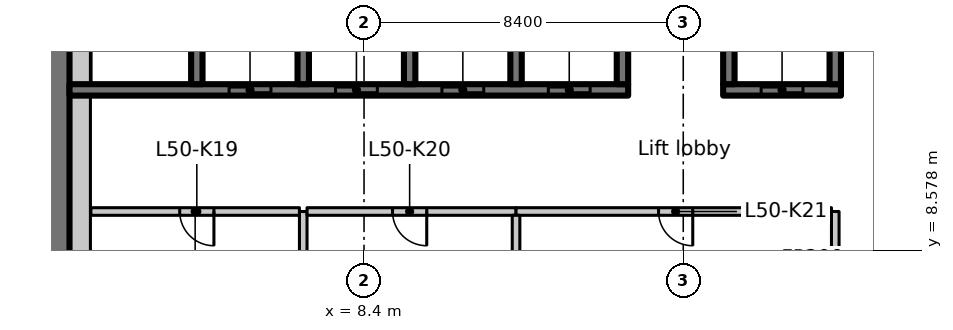
"""IFC4 building model, lengths in metres.
Left out: names, types, materials, properties, quantities, classifications, styles, units other than length and angle.
Written with IfcOpenShell. Run it as: python <this file> out.ifc"""

import sys

from ifc_helpers import new_model, si_unit, direction, frame, frame_2d, origin, place, context, subcontext, project, spatial, rectangle, extrude, element, fill, save


model = new_model("IFC4")
c1 = context("Model", 3, precision=1e-05, world=origin(), true_north=direction((0.0, 1.0)))
c2 = subcontext(c1, "Body", "Model", "MODEL_VIEW")
j1 = project(units=[si_unit("LENGTHUNIT", "METRE"), si_unit("PLANEANGLEUNIT", "RADIAN")], contexts=[c1])
p1 = place(None, origin())
s1 = spatial("IfcSite", under=j1, at=p1, CompositionType="ELEMENT")
p2 = place(p1, origin())
s2 = spatial("IfcBuilding", under=s1, at=p2, CompositionType="ELEMENT")
p3 = place(p2, frame((0.0, 0.0, 199.2)))
s3 = spatial("IfcBuildingStorey", under=s2, at=p3, CompositionType="ELEMENT", Elevation=199.2)
p4 = place(p3, frame((0.325, 7.286, 0.0), z_axis=(0.0, 0.0, 1.0), x_axis=(0.0, 1.0, 0.0)))
e1 = element("IfcWall", 1, at=p4, inside=s3, PredefinedType="SHEAR", context=c2, shape_type="SweptSolid", body=[
    extrude(rectangle(XDim=8.864, YDim=0.65, at=frame_2d((4.432, 0.0))), origin(), (0.0, 0.0, 1.0), 3.35),
])
p5 = place(p3, frame((0.65, 12.8, 0.0), z_axis=(0.0, 0.0, 1.0), x_axis=(1.0, 0.0, 0.0)))
e2 = element("IfcWall", 2, at=p5, inside=s3, PredefinedType="SHEAR", context=c2, shape_type="SweptSolid", body=[
    extrude(rectangle(XDim=14.7, YDim=0.3, at=frame_2d((7.35, 0.0))), origin(), (0.0, 0.0, 1.0), 3.35),
])
p6 = place(p5, frame((4.2, 0.0, 0.0)))
e3 = element("IfcOpeningElement", 3, at=p6, cuts=e2, PredefinedType="OPENING", context=c2, shape_type="SweptSolid", body=[
    extrude(rectangle(XDim=1.1, YDim=2.3, at=frame_2d((0.55, 1.15))), frame((0.0, 0.16, 0.0), z_axis=(0.0, -1.0, 0.0), x_axis=(1.0, 0.0, 0.0)), (0.0, 0.0, 1.0), 0.32),
])
p7 = place(p5, frame((7.0, 0.0, 0.0)))
e4 = element("IfcOpeningElement", 4, at=p7, cuts=e2, PredefinedType="OPENING", context=c2, shape_type="SweptSolid", body=[
    extrude(rectangle(XDim=1.1, YDim=2.3, at=frame_2d((0.55, 1.15))), frame((0.0, 0.16, 0.0), z_axis=(0.0, -1.0, 0.0), x_axis=(1.0, 0.0, 0.0)), (0.0, 0.0, 1.0), 0.32),
])
p8 = place(p5, frame((9.8, 0.0, 0.0)))
e5 = element("IfcOpeningElement", 5, at=p8, cuts=e2, PredefinedType="OPENING", context=c2, shape_type="SweptSolid", body=[
    extrude(rectangle(XDim=1.1, YDim=2.3, at=frame_2d((0.55, 1.15))), frame((0.0, 0.16, 0.0), z_axis=(0.0, -1.0, 0.0), x_axis=(1.0, 0.0, 0.0)), (0.0, 0.0, 1.0), 0.32),
])
p9 = place(p5, frame((12.6, 0.0, 0.0)))
e6 = element("IfcOpeningElement", 6, at=p9, cuts=e2, PredefinedType="OPENING", context=c2, shape_type="SweptSolid", body=[
    extrude(rectangle(XDim=1.1, YDim=2.3, at=frame_2d((0.55, 1.15))), frame((0.0, 0.16, 0.0), z_axis=(0.0, -1.0, 0.0), x_axis=(1.0, 0.0, 0.0)), (0.0, 0.0, 1.0), 0.32),
])
for number, where, z_axis, x_axis in (
    (7, (4.0, 12.95, 0.0), (0.0, 0.0, 1.0), (0.0, 1.0, 0.0)),
    (8, (6.8, 12.95, 0.0), (0.0, 0.0, 1.0), (0.0, 1.0, 0.0)),
    (9, (9.6, 12.95, 0.0), (0.0, 0.0, 1.0), (0.0, 1.0, 0.0)),
    (10, (12.4, 12.95, 0.0), (0.0, 0.0, 1.0), (0.0, 1.0, 0.0)),
    (11, (15.2, 12.95, 0.0), (0.0, 0.0, 1.0), (0.0, 1.0, 0.0)),
):
    element("IfcWall", number, at=place(p3, frame(where, z_axis=z_axis, x_axis=x_axis)), inside=s3, PredefinedType="SHEAR", context=c2, shape_type="SweptSolid", body=[
        extrude(rectangle(XDim=3.2, YDim=0.3, at=frame_2d((1.6, 0.0))), origin(), (0.0, 0.0, 1.0), 3.35),
    ])
p10 = place(p3, frame((17.85, 12.8, 0.0), z_axis=(0.0, 0.0, 1.0), x_axis=(1.0, 0.0, 0.0)))
e12 = element("IfcWall", 12, at=p10, inside=s3, PredefinedType="SHEAR", context=c2, shape_type="SweptSolid", body=[
    extrude(rectangle(XDim=3.1, YDim=0.3, at=frame_2d((1.55, 0.0))), origin(), (0.0, 0.0, 1.0), 3.35),
])
p11 = place(p10, frame((1.0, 0.0, 0.0)))
e13 = element("IfcOpeningElement", 13, at=p11, cuts=e12, PredefinedType="OPENING", context=c2, shape_type="SweptSolid", body=[
    extrude(rectangle(XDim=1.1, YDim=2.3, at=frame_2d((0.55, 1.15))), frame((0.0, 0.16, 0.0), z_axis=(0.0, -1.0, 0.0), x_axis=(1.0, 0.0, 0.0)), (0.0, 0.0, 1.0), 0.32),
])
for number, where, z_axis, x_axis in (
    (14, (18.0, 12.95, 0.0), (0.0, 0.0, 1.0), (0.0, 1.0, 0.0)),
    (15, (20.8, 12.95, 0.0), (0.0, 0.0, 1.0), (0.0, 1.0, 0.0)),
):
    element("IfcWall", number, at=place(p3, frame(where, z_axis=z_axis, x_axis=x_axis)), inside=s3, PredefinedType="SHEAR", context=c2, shape_type="SweptSolid", body=[
        extrude(rectangle(XDim=3.2, YDim=0.3, at=frame_2d((1.6, 0.0))), origin(), (0.0, 0.0, 1.0), 3.35),
    ])
p12 = place(p3, frame((6.8, 9.6, 0.0), z_axis=(0.0, 0.0, 1.0), x_axis=(0.0, -1.0, 0.0)))
e16 = element("IfcWall", 16, at=p12, inside=s3, PredefinedType="PARTITIONING", context=c2, shape_type="SweptSolid", body=[
    extrude(rectangle(XDim=2.5, YDim=0.2, at=frame_2d((1.25, 0.0))), origin(), (0.0, 0.0, 1.0), 3.35),
])
p13 = place(p3, frame((6.7, 9.6, 0.0), z_axis=(0.0, 0.0, 1.0), x_axis=(-1.0, 0.0, 0.0)))
e17 = element("IfcWall", 17, at=p13, inside=s3, PredefinedType="PARTITIONING", context=c2, shape_type="SweptSolid", body=[
    extrude(rectangle(XDim=5.488, YDim=0.2, at=frame_2d((2.744, 0.0))), origin(), (0.0, 0.0, 1.0), 3.35),
])
p14 = place(p13, frame((2.25, 0.0, 0.0)))
e18 = element("IfcOpeningElement", 18, at=p14, cuts=e17, PredefinedType="OPENING", context=c2, shape_type="SweptSolid", body=[
    extrude(rectangle(XDim=0.9, YDim=2.1, at=frame_2d((0.45, 1.05))), frame((0.0, 0.11, 0.0), z_axis=(0.0, -1.0, 0.0), x_axis=(1.0, 0.0, 0.0)), (0.0, 0.0, 1.0), 0.22),
])
p15 = place(p3, frame((12.4, 9.6, 0.0), z_axis=(0.0, 0.0, 1.0), x_axis=(-1.0, 0.0, 0.0)))
e19 = element("IfcWall", 19, at=p15, inside=s3, PredefinedType="PARTITIONING", context=c2, shape_type="SweptSolid", body=[
    extrude(rectangle(XDim=5.5, YDim=0.2, at=frame_2d((2.75, 0.0))), origin(), (0.0, 0.0, 1.0), 3.35),
])
p16 = place(p15, frame((2.35, 0.0, 0.0)))
e20 = element("IfcOpeningElement", 20, at=p16, cuts=e19, PredefinedType="OPENING", context=c2, shape_type="SweptSolid", body=[
    extrude(rectangle(XDim=0.9, YDim=2.1, at=frame_2d((0.45, 1.05))), frame((0.0, 0.11, 0.0), z_axis=(0.0, -1.0, 0.0), x_axis=(1.0, 0.0, 0.0)), (0.0, 0.0, 1.0), 0.22),
])
p17 = place(p3, frame((20.8, 7.1, 0.0), z_axis=(0.0, 0.0, 1.0), x_axis=(0.0, 1.0, 0.0)))
e21 = element("IfcWall", 21, at=p17, inside=s3, PredefinedType="PARTITIONING", context=c2, shape_type="SweptSolid", body=[
    extrude(rectangle(XDim=2.5, YDim=0.2, at=frame_2d((1.25, 0.0))), origin(), (0.0, 0.0, 1.0), 3.35),
])
p18 = place(p3, frame((20.7, 9.6, 0.0), z_axis=(0.0, 0.0, 1.0), x_axis=(-1.0, 0.0, 0.0)))
e22 = element("IfcWall", 22, at=p18, inside=s3, PredefinedType="PARTITIONING", context=c2, shape_type="SweptSolid", body=[
    extrude(rectangle(XDim=8.3, YDim=0.2, at=frame_2d((4.15, 0.0))), origin(), (0.0, 0.0, 1.0), 3.35),
])
p19 = place(p18, frame((3.65, 0.0, 0.0)))
e23 = element("IfcOpeningElement", 23, at=p19, cuts=e22, PredefinedType="OPENING", context=c2, shape_type="SweptSolid", body=[
    extrude(rectangle(XDim=0.9, YDim=2.1, at=frame_2d((0.45, 1.05))), frame((0.0, 0.11, 0.0), z_axis=(0.0, -1.0, 0.0), x_axis=(1.0, 0.0, 0.0)), (0.0, 0.0, 1.0), 0.22),
])
p20 = place(p3, frame((12.4, 9.5, 0.0), z_axis=(0.0, 0.0, 1.0), x_axis=(0.0, -1.0, 0.0)))
e24 = element("IfcWall", 24, at=p20, inside=s3, PredefinedType="PARTITIONING", context=c2, shape_type="SweptSolid", body=[
    extrude(rectangle(XDim=2.4, YDim=0.2, at=frame_2d((1.2, 0.0))), origin(), (0.0, 0.0, 1.0), 3.35),
])
p21 = place(p3, frame((0.925, 7.286, 0.0), z_axis=(0.0, 0.0, 1.0), x_axis=(0.0, 1.0, 0.0)))
e25 = element("IfcWall", 25, at=p21, inside=s3, PredefinedType="PARTITIONING", context=c2, shape_type="SweptSolid", body=[
    extrude(rectangle(XDim=5.364, YDim=0.55, at=frame_2d((2.682, 0.0))), origin(), (0.0, 0.0, 1.0), 3.35),
])
p22 = place(p3, frame((0.925, 12.95, 0.0), z_axis=(0.0, 0.0, 1.0), x_axis=(0.0, 1.0, 0.0)))
e26 = element("IfcWall", 26, at=p22, inside=s3, PredefinedType="PARTITIONING", context=c2, shape_type="SweptSolid", body=[
    extrude(rectangle(XDim=2.65, YDim=0.55, at=frame_2d((1.325, 0.0))), origin(), (0.0, 0.0, 1.0), 3.35),
])
p23 = place(p6, origin())
e27 = element("IfcDoor", 27, at=p23, inside=s3, OperationType="SLIDING_TO_LEFT", PredefinedType="DOOR", context=c2, shape_type="SweptSolid", body=[
    extrude(rectangle(XDim=1.1, YDim=2.3, at=frame_2d((0.55, 1.15))), frame((0.0, 0.025, 0.0), z_axis=(0.0, -1.0, 0.0), x_axis=(1.0, 0.0, 0.0)), (0.0, 0.0, 1.0), 0.05),
])
fill(e3, e27)
p24 = place(p7, origin())
e28 = element("IfcDoor", 28, at=p24, inside=s3, OperationType="SLIDING_TO_LEFT", PredefinedType="DOOR", context=c2, shape_type="SweptSolid", body=[
    extrude(rectangle(XDim=1.1, YDim=2.3, at=frame_2d((0.55, 1.15))), frame((0.0, 0.025, 0.0), z_axis=(0.0, -1.0, 0.0), x_axis=(1.0, 0.0, 0.0)), (0.0, 0.0, 1.0), 0.05),
])
fill(e4, e28)
p25 = place(p8, origin())
e29 = element("IfcDoor", 29, at=p25, inside=s3, OperationType="SLIDING_TO_LEFT", PredefinedType="DOOR", context=c2, shape_type="SweptSolid", body=[
    extrude(rectangle(XDim=1.1, YDim=2.3, at=frame_2d((0.55, 1.15))), frame((0.0, 0.025, 0.0), z_axis=(0.0, -1.0, 0.0), x_axis=(1.0, 0.0, 0.0)), (0.0, 0.0, 1.0), 0.05),
])
fill(e5, e29)
p26 = place(p9, origin())
e30 = element("IfcDoor", 30, at=p26, inside=s3, OperationType="SLIDING_TO_LEFT", PredefinedType="DOOR", context=c2, shape_type="SweptSolid", body=[
    extrude(rectangle(XDim=1.1, YDim=2.3, at=frame_2d((0.55, 1.15))), frame((0.0, 0.025, 0.0), z_axis=(0.0, -1.0, 0.0), x_axis=(1.0, 0.0, 0.0)), (0.0, 0.0, 1.0), 0.05),
])
fill(e6, e30)
p27 = place(p11, origin())
e31 = element("IfcDoor", 31, at=p27, inside=s3, OperationType="SLIDING_TO_LEFT", PredefinedType="DOOR", context=c2, shape_type="SweptSolid", body=[
    extrude(rectangle(XDim=1.1, YDim=2.3, at=frame_2d((0.55, 1.15))), frame((0.0, 0.025, 0.0), z_axis=(0.0, -1.0, 0.0), x_axis=(1.0, 0.0, 0.0)), (0.0, 0.0, 1.0), 0.05),
])
fill(e13, e31)
p28 = place(p14, origin())
e32 = element("IfcDoor", 32, at=p28, inside=s3, OperationType="SINGLE_SWING_RIGHT", PredefinedType="DOOR", context=c2, shape_type="SweptSolid", body=[
    extrude(rectangle(XDim=0.9, YDim=2.1, at=frame_2d((0.45, 1.05))), frame((0.0, 0.025, 0.0), z_axis=(0.0, -1.0, 0.0), x_axis=(1.0, 0.0, 0.0)), (0.0, 0.0, 1.0), 0.05),
])
fill(e18, e32)
p29 = place(p16, origin())
e33 = element("IfcDoor", 33, at=p29, inside=s3, OperationType="SINGLE_SWING_LEFT", PredefinedType="DOOR", context=c2, shape_type="SweptSolid", body=[
    extrude(rectangle(XDim=0.9, YDim=2.1, at=frame_2d((0.45, 1.05))), frame((0.0, 0.025, 0.0), z_axis=(0.0, -1.0, 0.0), x_axis=(1.0, 0.0, 0.0)), (0.0, 0.0, 1.0), 0.05),
])
fill(e20, e33)
p30 = place(p19, origin())
e34 = element("IfcDoor", 34, at=p30, inside=s3, OperationType="SINGLE_SWING_RIGHT", PredefinedType="DOOR", context=c2, shape_type="SweptSolid", body=[
    extrude(rectangle(XDim=0.9, YDim=2.1, at=frame_2d((0.45, 1.05))), frame((0.0, 0.025, 0.0), z_axis=(0.0, -1.0, 0.0), x_axis=(1.0, 0.0, 0.0)), (0.0, 0.0, 1.0), 0.05),
])
fill(e23, e34)
save(model, sys.argv[1])
